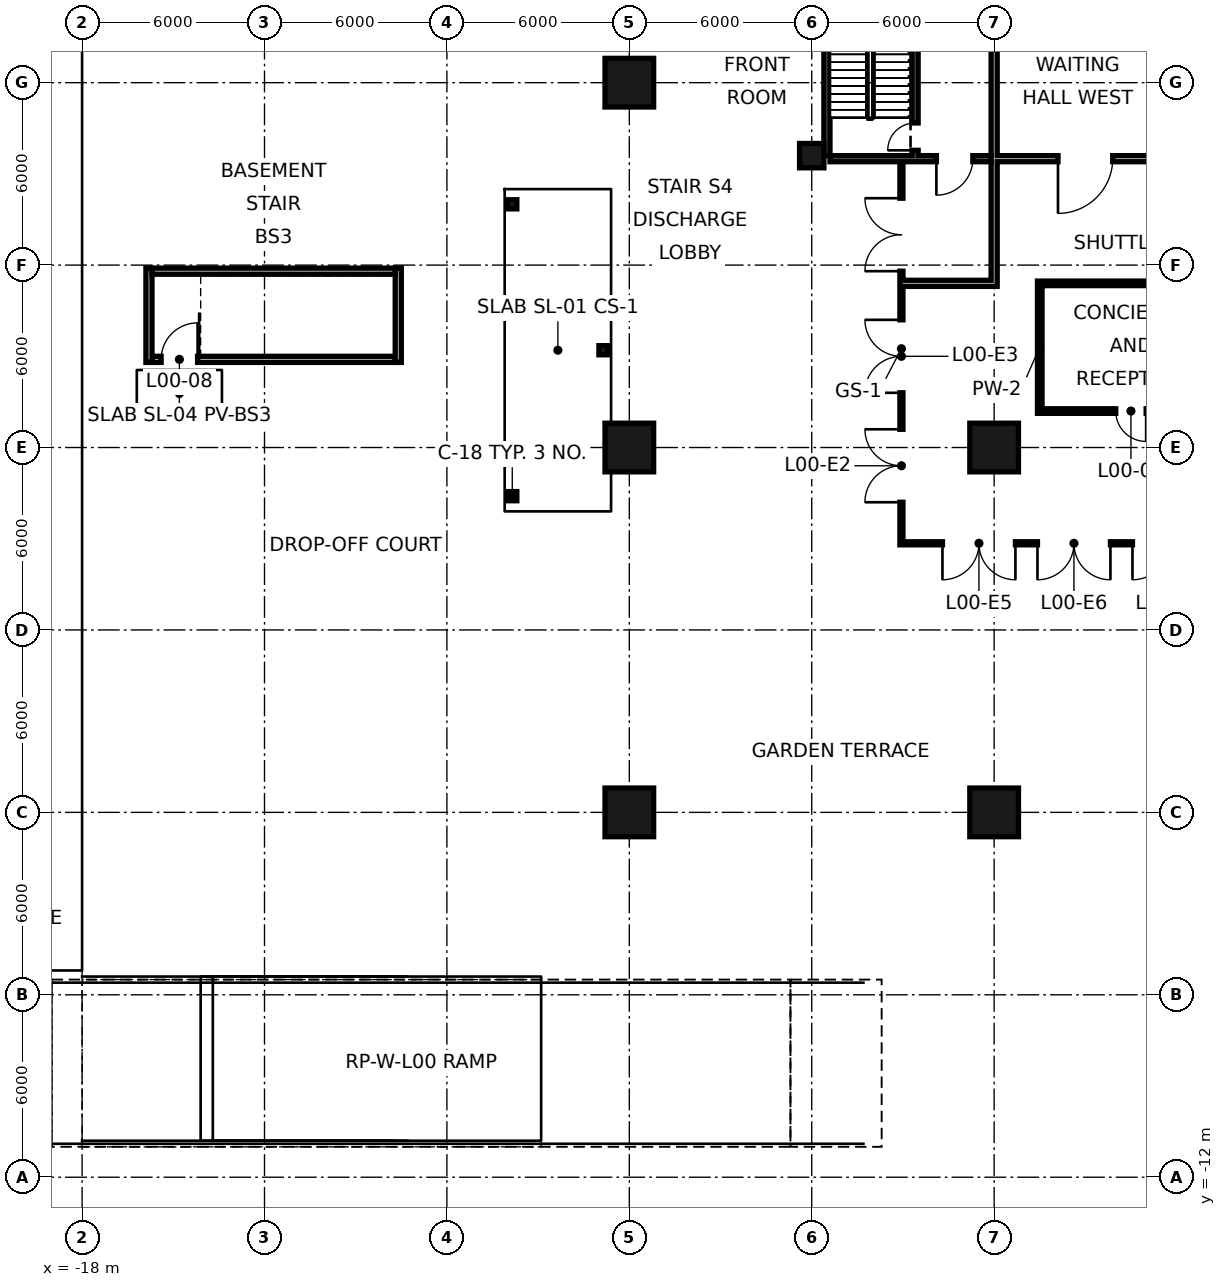
"""IFC4 building model, lengths in metres.
Left out: names, types, materials, properties, quantities, classifications, styles, units other than length and angle.
Written with IfcOpenShell. Run it as: python <this file> out.ifc"""

import sys

from ifc_helpers import new_model, si_unit, direction, frame, frame_2d, origin, origin_2d, place, context, subcontext, project, spatial, rectangle, hollow_rectangle, extrude, element, fill, save


model = new_model("IFC4")
c1 = context("Model", 3, precision=1e-05, world=origin(), true_north=direction((0.0, 1.0)))
c2 = subcontext(c1, "Body", "Model", "MODEL_VIEW")
j1 = project(units=[si_unit("LENGTHUNIT", "METRE"), si_unit("PLANEANGLEUNIT", "RADIAN")], contexts=[c1])
p1 = place(None, origin())
s1 = spatial("IfcSite", under=j1, at=p1, CompositionType="ELEMENT")
p2 = place(p1, origin())
s2 = spatial("IfcBuilding", under=s1, at=p2, CompositionType="ELEMENT")
p3 = place(p2, origin())
s3 = spatial("IfcBuildingStorey", under=s2, at=p3, CompositionType="ELEMENT", Elevation=0.0)
for number, where, z_axis, x_axis in (
    (1, (0.0, 0.0, 0.0), (0.0, 0.0, 1.0), (1.0, 0.0, 0.0)),
    (2, (0.0, 12.0, 0.0), (0.0, 0.0, 1.0), (1.0, 0.0, 0.0)),
    (3, (0.0, 24.0, 0.0), (0.0, 0.0, 1.0), (1.0, 0.0, 0.0)),
):
    element("IfcColumn", number, at=place(p3, frame(where, z_axis=z_axis, x_axis=x_axis)), inside=s3, PredefinedType="COLUMN", context=c2, shape_type="SweptSolid", body=[
        extrude(hollow_rectangle(XDim=1.6, YDim=1.6, WallThickness=0.07, at=origin_2d()), origin(), (0.0, 0.0, 1.0), 15.0),
    ])
p4 = place(p3, frame((6.0, 21.6, 0.0), z_axis=(0.0, 0.0, 1.0), x_axis=(1.0, 0.0, 0.0)))
e4 = element("IfcColumn", 4, at=p4, inside=s3, PredefinedType="COLUMN", context=c2, shape_type="SweptSolid", body=[
    extrude(hollow_rectangle(XDim=0.8, YDim=0.8, WallThickness=0.07, at=origin_2d()), origin(), (0.0, 0.0, 1.0), 15.0),
])
for number, where, z_axis, x_axis in (
    (5, (12.0, 0.0, 0.0), (0.0, 0.0, 1.0), (1.0, 0.0, 0.0)),
    (6, (12.0, 12.0, 0.0), (0.0, 0.0, 1.0), (1.0, 0.0, 0.0)),
):
    element("IfcColumn", number, at=place(p3, frame(where, z_axis=z_axis, x_axis=x_axis)), inside=s3, PredefinedType="COLUMN", context=c2, shape_type="SweptSolid", body=[
        extrude(hollow_rectangle(XDim=1.6, YDim=1.6, WallThickness=0.07, at=origin_2d()), origin(), (0.0, 0.0, 1.0), 15.0),
    ])
p5 = place(p3, frame((8.95, 21.6, 0.0), z_axis=(0.0, 0.0, 1.0), x_axis=(0.0, -1.0, 0.0)))
e7 = element("IfcWall", 7, at=p5, inside=s3, PredefinedType="SOLIDWALL", context=c2, shape_type="SweptSolid", body=[
    extrude(rectangle(XDim=12.7, YDim=0.1, at=frame_2d((6.35, 0.0))), origin(), (0.0, 0.0, 1.0), 13.83),
])
p6 = place(p5, frame((9.0, 0.0, 0.0)))
e8 = element("IfcOpeningElement", 8, at=p6, cuts=e7, PredefinedType="OPENING", context=c2, shape_type="SweptSolid", body=[
    extrude(rectangle(XDim=2.4, YDim=2.6, at=frame_2d((1.2, 1.3))), frame((0.0, 0.06, 0.0), z_axis=(0.0, -1.0, 0.0), x_axis=(1.0, 0.0, 0.0)), (0.0, 0.0, 1.0), 0.12),
])
p7 = place(p5, frame((5.4, 0.0, 0.0)))
e9 = element("IfcOpeningElement", 9, at=p7, cuts=e7, PredefinedType="OPENING", context=c2, shape_type="SweptSolid", body=[
    extrude(rectangle(XDim=2.4, YDim=2.6, at=frame_2d((1.2, 1.3))), frame((0.0, 0.06, 0.0), z_axis=(0.0, -1.0, 0.0), x_axis=(1.0, 0.0, 0.0)), (0.0, 0.0, 1.0), 0.12),
])
p8 = place(p5, frame((1.4, 0.0, 0.0)))
e10 = element("IfcOpeningElement", 10, at=p8, cuts=e7, PredefinedType="OPENING", context=c2, shape_type="SweptSolid", body=[
    extrude(rectangle(XDim=2.4, YDim=2.6, at=frame_2d((1.2, 1.3))), frame((0.0, 0.06, 0.0), z_axis=(0.0, -1.0, 0.0), x_axis=(1.0, 0.0, 0.0)), (0.0, 0.0, 1.0), 0.12),
])
p9 = place(p3, frame((8.9, 8.85, 0.0), z_axis=(0.0, 0.0, 1.0), x_axis=(1.0, 0.0, 0.0)))
e11 = element("IfcWall", 11, at=p9, inside=s3, PredefinedType="SOLIDWALL", context=c2, shape_type="SweptSolid", body=[
    extrude(rectangle(XDim=33.3, YDim=0.1, at=frame_2d((16.65, 0.0))), origin(), (0.0, 0.0, 1.0), 13.83),
])
p10 = place(p9, frame((1.4, 0.0, 0.0)))
e12 = element("IfcOpeningElement", 12, at=p10, cuts=e11, PredefinedType="OPENING", context=c2, shape_type="SweptSolid", body=[
    extrude(rectangle(XDim=2.4, YDim=2.6, at=frame_2d((1.2, 1.3))), frame((0.0, 0.06, 0.0), z_axis=(0.0, -1.0, 0.0), x_axis=(1.0, 0.0, 0.0)), (0.0, 0.0, 1.0), 0.12),
])
p11 = place(p9, frame((4.525, 0.0, 0.0)))
e13 = element("IfcOpeningElement", 13, at=p11, cuts=e11, PredefinedType="OPENING", context=c2, shape_type="SweptSolid", body=[
    extrude(rectangle(XDim=2.4, YDim=2.6, at=frame_2d((1.2, 1.3))), frame((0.0, 0.06, 0.0), z_axis=(0.0, -1.0, 0.0), x_axis=(1.0, 0.0, 0.0)), (0.0, 0.0, 1.0), 0.12),
])
p12 = place(p9, frame((7.65, 0.0, 0.0)))
e14 = element("IfcOpeningElement", 14, at=p12, cuts=e11, PredefinedType="OPENING", context=c2, shape_type="SweptSolid", body=[
    extrude(rectangle(XDim=2.4, YDim=2.6, at=frame_2d((1.2, 1.3))), frame((0.0, 0.06, 0.0), z_axis=(0.0, -1.0, 0.0), x_axis=(1.0, 0.0, 0.0)), (0.0, 0.0, 1.0), 0.12),
])
p13 = place(p9, frame((10.775, 0.0, 0.0)))
e15 = element("IfcOpeningElement", 15, at=p13, cuts=e11, PredefinedType="OPENING", context=c2, shape_type="SweptSolid", body=[
    extrude(rectangle(XDim=2.4, YDim=2.6, at=frame_2d((1.2, 1.3))), frame((0.0, 0.06, 0.0), z_axis=(0.0, -1.0, 0.0), x_axis=(1.0, 0.0, 0.0)), (0.0, 0.0, 1.0), 0.12),
])
p14 = place(p9, frame((13.9, 0.0, 0.0)))
e16 = element("IfcOpeningElement", 16, at=p14, cuts=e11, PredefinedType="OPENING", context=c2, shape_type="SweptSolid", body=[
    extrude(rectangle(XDim=2.4, YDim=2.6, at=frame_2d((1.2, 1.3))), frame((0.0, 0.06, 0.0), z_axis=(0.0, -1.0, 0.0), x_axis=(1.0, 0.0, 0.0)), (0.0, 0.0, 1.0), 0.12),
])
p15 = place(p9, frame((17.025, 0.0, 0.0)))
e17 = element("IfcOpeningElement", 17, at=p15, cuts=e11, PredefinedType="OPENING", context=c2, shape_type="SweptSolid", body=[
    extrude(rectangle(XDim=2.4, YDim=2.6, at=frame_2d((1.2, 1.3))), frame((0.0, 0.06, 0.0), z_axis=(0.0, -1.0, 0.0), x_axis=(1.0, 0.0, 0.0)), (0.0, 0.0, 1.0), 0.12),
])
p16 = place(p9, frame((20.15, 0.0, 0.0)))
e18 = element("IfcOpeningElement", 18, at=p16, cuts=e11, PredefinedType="OPENING", context=c2, shape_type="SweptSolid", body=[
    extrude(rectangle(XDim=2.4, YDim=2.6, at=frame_2d((1.2, 1.3))), frame((0.0, 0.06, 0.0), z_axis=(0.0, -1.0, 0.0), x_axis=(1.0, 0.0, 0.0)), (0.0, 0.0, 1.0), 0.12),
])
p17 = place(p9, frame((23.275, 0.0, 0.0)))
e19 = element("IfcOpeningElement", 19, at=p17, cuts=e11, PredefinedType="OPENING", context=c2, shape_type="SweptSolid", body=[
    extrude(rectangle(XDim=2.4, YDim=2.6, at=frame_2d((1.2, 1.3))), frame((0.0, 0.06, 0.0), z_axis=(0.0, -1.0, 0.0), x_axis=(1.0, 0.0, 0.0)), (0.0, 0.0, 1.0), 0.12),
])
p18 = place(p9, frame((26.4, 0.0, 0.0)))
e20 = element("IfcOpeningElement", 20, at=p18, cuts=e11, PredefinedType="OPENING", context=c2, shape_type="SweptSolid", body=[
    extrude(rectangle(XDim=2.4, YDim=2.6, at=frame_2d((1.2, 1.3))), frame((0.0, 0.06, 0.0), z_axis=(0.0, -1.0, 0.0), x_axis=(1.0, 0.0, 0.0)), (0.0, 0.0, 1.0), 0.12),
])
for number, where, z_axis, x_axis in (
    (21, (-15.8, 14.8, 0.0), (0.0, 0.0, 1.0), (0.0, 1.0, 0.0)),
    (22, (-7.6, 14.8, 0.0), (0.0, 0.0, 1.0), (0.0, 1.0, 0.0)),
):
    element("IfcWall", number, at=place(p3, frame(where, z_axis=z_axis, x_axis=x_axis)), inside=s3, PredefinedType="SOLIDWALL", context=c2, shape_type="SweptSolid", body=[
        extrude(rectangle(XDim=3.1, YDim=0.2, at=frame_2d((1.55, 0.0))), origin(), (0.0, 0.0, 1.0), 14.55),
    ])
p19 = place(p3, frame((12.0, 17.3, 0.0), z_axis=(0.0, 0.0, 1.0), x_axis=(0.0, 1.0, 0.0)))
e23 = element("IfcWall", 23, at=p19, inside=s3, PredefinedType="SOLIDWALL", context=c2, shape_type="SweptSolid", body=[
    extrude(rectangle(XDim=4.2, YDim=0.2, at=frame_2d((2.1, 0.0))), origin(), (0.0, 0.0, 1.0), 13.85),
])
p20 = place(p3, frame((13.5, 13.125, 0.0), z_axis=(0.0, 0.0, 1.0), x_axis=(0.0, 1.0, 0.0)))
e24 = element("IfcWall", 24, at=p20, inside=s3, PredefinedType="PARTITIONING", context=c2, shape_type="SweptSolid", body=[
    extrude(rectangle(XDim=4.35, YDim=0.15, at=frame_2d((2.175, 0.0))), origin(), (0.0, 0.0, 1.0), 14.55),
])
p21 = place(p3, frame((13.575, 13.2, 0.0), z_axis=(0.0, 0.0, 1.0), x_axis=(1.0, 0.0, 0.0)))
e25 = element("IfcWall", 25, at=p21, inside=s3, PredefinedType="PARTITIONING", context=c2, shape_type="SweptSolid", body=[
    extrude(rectangle(XDim=5.85, YDim=0.15, at=frame_2d((2.925, 0.0))), origin(), (0.0, 0.0, 1.0), 14.55),
])
p22 = place(p21, frame((2.425, 0.0, 0.0)))
e26 = element("IfcOpeningElement", 26, at=p22, cuts=e25, PredefinedType="OPENING", context=c2, shape_type="SweptSolid", body=[
    extrude(rectangle(XDim=1.0, YDim=2.4, at=frame_2d((0.5, 1.2))), frame((0.0, 0.085, 0.0), z_axis=(0.0, -1.0, 0.0), x_axis=(1.0, 0.0, 0.0)), (0.0, 0.0, 1.0), 0.17),
])
p23 = place(p3, frame((-15.7, 14.9, 0.0), z_axis=(0.0, 0.0, 1.0), x_axis=(1.0, 0.0, 0.0)))
e27 = element("IfcWall", 27, at=p23, inside=s3, PredefinedType="SOLIDWALL", context=c2, shape_type="SweptSolid", body=[
    extrude(rectangle(XDim=8.0, YDim=0.2, at=frame_2d((4.0, 0.0))), origin(), (0.0, 0.0, 1.0), 14.55),
])
p24 = place(p23, frame((0.3, 0.0, 0.0)))
e28 = element("IfcOpeningElement", 28, at=p24, cuts=e27, PredefinedType="OPENING", context=c2, shape_type="SweptSolid", body=[
    extrude(rectangle(XDim=1.2, YDim=2.4, at=frame_2d((0.6, 1.2))), frame((0.0, 0.11, 0.0), z_axis=(0.0, -1.0, 0.0), x_axis=(1.0, 0.0, 0.0)), (0.0, 0.0, 1.0), 0.22),
])
p25 = place(p3, frame((9.0, 17.4, 0.0), z_axis=(0.0, 0.0, 1.0), x_axis=(1.0, 0.0, 0.0)))
e29 = element("IfcWall", 29, at=p25, inside=s3, PredefinedType="SOLIDWALL", context=c2, shape_type="SweptSolid", body=[
    extrude(rectangle(XDim=2.9, YDim=0.2, at=frame_2d((1.45, 0.0))), origin(), (0.0, 0.0, 1.0), 14.55),
])
p26 = place(p3, frame((13.575, 17.4, 0.0), z_axis=(0.0, 0.0, 1.0), x_axis=(1.0, 0.0, 0.0)))
e30 = element("IfcWall", 30, at=p26, inside=s3, PredefinedType="PARTITIONING", context=c2, shape_type="SweptSolid", body=[
    extrude(rectangle(XDim=5.85, YDim=0.15, at=frame_2d((2.925, 0.0))), origin(), (0.0, 0.0, 1.0), 14.55),
])
p27 = place(p3, frame((-15.7, 17.8, 0.0), z_axis=(0.0, 0.0, 1.0), x_axis=(1.0, 0.0, 0.0)))
e31 = element("IfcWall", 31, at=p27, inside=s3, PredefinedType="SOLIDWALL", context=c2, shape_type="SweptSolid", body=[
    extrude(rectangle(XDim=8.0, YDim=0.2, at=frame_2d((4.0, 0.0))), origin(), (0.0, 0.0, 1.0), 14.55),
])
p28 = place(p3, frame((6.5, 21.6, 0.0), z_axis=(0.0, 0.0, 1.0), x_axis=(0.0, 1.0, 0.0)))
e32 = element("IfcWall", 32, at=p28, inside=s3, PredefinedType="SOLIDWALL", context=c2, shape_type="SweptSolid", body=[
    extrude(rectangle(XDim=23.5, YDim=0.2, at=frame_2d((11.75, 0.0))), origin(), (0.0, 0.0, 1.0), 14.55),
])
p29 = place(p3, frame((12.1, 21.5, 0.0), z_axis=(0.0, 0.0, 1.0), x_axis=(1.0, 0.0, 0.0)))
e33 = element("IfcWall", 33, at=p29, inside=s3, PredefinedType="SOLIDWALL", context=c2, shape_type="SweptSolid", body=[
    extrude(rectangle(XDim=23.8, YDim=0.2, at=frame_2d((11.9, 0.0))), origin(), (0.0, 0.0, 1.0), 13.85),
])
p30 = place(p29, frame((2.0, 0.0, 0.0)))
e34 = element("IfcOpeningElement", 34, at=p30, cuts=e33, PredefinedType="OPENING", context=c2, shape_type="SweptSolid", body=[
    extrude(rectangle(XDim=1.8, YDim=2.1, at=frame_2d((0.9, 1.05))), frame((0.0, 0.11, 0.0), z_axis=(0.0, -1.0, 0.0), x_axis=(1.0, 0.0, 0.0)), (0.0, 0.0, 1.0), 0.22),
])
p31 = place(p29, frame((11.0, 0.0, 0.0)))
e35 = element("IfcOpeningElement", 35, at=p31, cuts=e33, PredefinedType="OPENING", context=c2, shape_type="SweptSolid", body=[
    extrude(rectangle(XDim=1.8, YDim=2.1, at=frame_2d((0.9, 1.05))), frame((0.0, 0.11, 0.0), z_axis=(0.0, -1.0, 0.0), x_axis=(1.0, 0.0, 0.0)), (0.0, 0.0, 1.0), 0.22),
])
p32 = place(p29, frame((20.0, 0.0, 0.0)))
e36 = element("IfcOpeningElement", 36, at=p32, cuts=e33, PredefinedType="OPENING", context=c2, shape_type="SweptSolid", body=[
    extrude(rectangle(XDim=1.8, YDim=2.1, at=frame_2d((0.9, 1.05))), frame((0.0, 0.11, 0.0), z_axis=(0.0, -1.0, 0.0), x_axis=(1.0, 0.0, 0.0)), (0.0, 0.0, 1.0), 0.22),
])
p33 = place(p3, frame((12.0, 21.5, 0.0), z_axis=(0.0, 0.0, 1.0), x_axis=(0.0, 1.0, 0.0)))
e37 = element("IfcWall", 37, at=p33, inside=s3, PredefinedType="PARTITIONING", context=c2, shape_type="SweptSolid", body=[
    extrude(rectangle(XDim=6.0, YDim=0.2, at=frame_2d((3.0, 0.0))), origin(), (0.0, 0.0, 1.0), 13.85),
])
p34 = place(p3, frame((9.4, 21.5, 0.0), z_axis=(0.0, 0.0, 1.0), x_axis=(0.0, 1.0, 0.0)))
e38 = element("IfcWall", 38, at=p34, inside=s3, PredefinedType="SOLIDWALL", context=c2, shape_type="SweptSolid", body=[
    extrude(rectangle(XDim=23.5, YDim=0.2, at=frame_2d((11.75, 0.0))), origin(), (0.0, 0.0, 1.0), 13.85),
])
p35 = place(p34, frame((7.1, 0.0, 0.0)))
e39 = element("IfcOpeningElement", 39, at=p35, cuts=e38, PredefinedType="OPENING", context=c2, shape_type="SweptSolid", body=[
    extrude(rectangle(XDim=1.1, YDim=2.1, at=frame_2d((0.55, 1.05))), frame((0.0, 0.11, 0.0), z_axis=(0.0, -1.0, 0.0), x_axis=(1.0, 0.0, 0.0)), (0.0, 0.0, 1.0), 0.22),
])
p36 = place(p34, frame((10.2, 0.0, 0.0)))
e40 = element("IfcOpeningElement", 40, at=p36, cuts=e38, PredefinedType="OPENING", context=c2, shape_type="SweptSolid", body=[
    extrude(rectangle(XDim=1.1, YDim=2.1, at=frame_2d((0.55, 1.05))), frame((0.0, 0.11, 0.0), z_axis=(0.0, -1.0, 0.0), x_axis=(1.0, 0.0, 0.0)), (0.0, 0.0, 1.0), 0.22),
])
p37 = place(p34, frame((13.3, 0.0, 0.0)))
e41 = element("IfcOpeningElement", 41, at=p37, cuts=e38, PredefinedType="OPENING", context=c2, shape_type="SweptSolid", body=[
    extrude(rectangle(XDim=1.1, YDim=2.1, at=frame_2d((0.55, 1.05))), frame((0.0, 0.11, 0.0), z_axis=(0.0, -1.0, 0.0), x_axis=(1.0, 0.0, 0.0)), (0.0, 0.0, 1.0), 0.22),
])
p38 = place(p34, frame((22.2, 0.0, 0.0)))
e42 = element("IfcOpeningElement", 42, at=p38, cuts=e38, PredefinedType="OPENING", context=c2, shape_type="SweptSolid", body=[
    extrude(rectangle(XDim=1.0, YDim=2.1, at=frame_2d((0.5, 1.05))), frame((0.0, 0.11, 0.0), z_axis=(0.0, -1.0, 0.0), x_axis=(1.0, 0.0, 0.0)), (0.0, 0.0, 1.0), 0.22),
])
p39 = place(p34, frame((0.275, 0.0, 0.0)))
e43 = element("IfcOpeningElement", 43, at=p39, cuts=e38, PredefinedType="OPENING", context=c2, shape_type="SweptSolid", body=[
    extrude(rectangle(XDim=0.9, YDim=2.1, at=frame_2d((0.45, 1.05))), frame((0.0, 0.11, 0.0), z_axis=(0.0, -1.0, 0.0), x_axis=(1.0, 0.0, 0.0)), (0.0, 0.0, 1.0), 0.22),
])
p40 = place(p3, frame((6.6, 21.5, 0.0), z_axis=(0.0, 0.0, 1.0), x_axis=(1.0, 0.0, 0.0)))
e44 = element("IfcWall", 44, at=p40, inside=s3, PredefinedType="SOLIDWALL", context=c2, shape_type="SweptSolid", body=[
    extrude(rectangle(XDim=5.3, YDim=0.2, at=frame_2d((2.65, 0.0))), origin(), (0.0, 0.0, 1.0), 13.85),
])
p41 = place(p40, frame((3.5, 0.0, 0.0)))
e45 = element("IfcOpeningElement", 45, at=p41, cuts=e44, PredefinedType="OPENING", context=c2, shape_type="SweptSolid", body=[
    extrude(rectangle(XDim=1.2, YDim=2.1, at=frame_2d((0.6, 1.05))), frame((0.0, 0.11, 0.0), z_axis=(0.0, -1.0, 0.0), x_axis=(1.0, 0.0, 0.0)), (0.0, 0.0, 1.0), 0.22),
])
for number, where, z_axis, x_axis in (
    (46, (-3.85, 10.4, 0.0), (0.0, 0.0, 1.0), (1.0, 0.0, 0.0)),
    (47, (-3.85, 20.0, 0.0), (0.0, 0.0, 1.0), (1.0, 0.0, 0.0)),
    (48, (-0.85, 15.2, 0.0), (0.0, 0.0, 1.0), (1.0, 0.0, 0.0)),
):
    element("IfcColumn", number, at=place(p3, frame(where, z_axis=z_axis, x_axis=x_axis)), inside=s3, PredefinedType="COLUMN", context=c2, shape_type="SweptSolid", body=[
        extrude(hollow_rectangle(XDim=0.3, YDim=0.3, WallThickness=0.016, at=origin_2d()), origin(), (0.0, 0.0, 1.0), 14.7),
    ])
p42 = place(p6, frame((2.4, 0.0, 0.0), z_axis=(0.0, 0.0, 1.0), x_axis=(-1.0, 0.0, 0.0)))
e49 = element("IfcDoor", 49, at=p42, inside=s3, OperationType="DOUBLE_DOOR_SINGLE_SWING", PredefinedType="DOOR", context=c2, shape_type="SweptSolid", body=[
    extrude(rectangle(XDim=2.4, YDim=2.6, at=frame_2d((1.2, 1.3))), frame((0.0, 0.025, 0.0), z_axis=(0.0, -1.0, 0.0), x_axis=(1.0, 0.0, 0.0)), (0.0, 0.0, 1.0), 0.05),
])
fill(e8, e49)
p43 = place(p7, frame((2.4, 0.0, 0.0), z_axis=(0.0, 0.0, 1.0), x_axis=(-1.0, 0.0, 0.0)))
e50 = element("IfcDoor", 50, at=p43, inside=s3, OperationType="DOUBLE_DOOR_SINGLE_SWING", PredefinedType="DOOR", context=c2, shape_type="SweptSolid", body=[
    extrude(rectangle(XDim=2.4, YDim=2.6, at=frame_2d((1.2, 1.3))), frame((0.0, 0.025, 0.0), z_axis=(0.0, -1.0, 0.0), x_axis=(1.0, 0.0, 0.0)), (0.0, 0.0, 1.0), 0.05),
])
fill(e9, e50)
p44 = place(p8, frame((2.4, 0.0, 0.0), z_axis=(0.0, 0.0, 1.0), x_axis=(-1.0, 0.0, 0.0)))
e51 = element("IfcDoor", 51, at=p44, inside=s3, OperationType="DOUBLE_DOOR_SINGLE_SWING", PredefinedType="DOOR", context=c2, shape_type="SweptSolid", body=[
    extrude(rectangle(XDim=2.4, YDim=2.6, at=frame_2d((1.2, 1.3))), frame((0.0, 0.025, 0.0), z_axis=(0.0, -1.0, 0.0), x_axis=(1.0, 0.0, 0.0)), (0.0, 0.0, 1.0), 0.05),
])
fill(e10, e51)
p45 = place(p10, frame((2.4, 0.0, 0.0), z_axis=(0.0, 0.0, 1.0), x_axis=(-1.0, 0.0, 0.0)))
e52 = element("IfcDoor", 52, at=p45, inside=s3, OperationType="DOUBLE_DOOR_SINGLE_SWING", PredefinedType="DOOR", context=c2, shape_type="SweptSolid", body=[
    extrude(rectangle(XDim=2.4, YDim=2.6, at=frame_2d((1.2, 1.3))), frame((0.0, 0.025, 0.0), z_axis=(0.0, -1.0, 0.0), x_axis=(1.0, 0.0, 0.0)), (0.0, 0.0, 1.0), 0.05),
])
fill(e12, e52)
p46 = place(p11, frame((2.4, 0.0, 0.0), z_axis=(0.0, 0.0, 1.0), x_axis=(-1.0, 0.0, 0.0)))
e53 = element("IfcDoor", 53, at=p46, inside=s3, OperationType="DOUBLE_DOOR_SINGLE_SWING", PredefinedType="DOOR", context=c2, shape_type="SweptSolid", body=[
    extrude(rectangle(XDim=2.4, YDim=2.6, at=frame_2d((1.2, 1.3))), frame((0.0, 0.025, 0.0), z_axis=(0.0, -1.0, 0.0), x_axis=(1.0, 0.0, 0.0)), (0.0, 0.0, 1.0), 0.05),
])
fill(e13, e53)
p47 = place(p12, frame((2.4, 0.0, 0.0), z_axis=(0.0, 0.0, 1.0), x_axis=(-1.0, 0.0, 0.0)))
e54 = element("IfcDoor", 54, at=p47, inside=s3, OperationType="DOUBLE_DOOR_SINGLE_SWING", PredefinedType="DOOR", context=c2, shape_type="SweptSolid", body=[
    extrude(rectangle(XDim=2.4, YDim=2.6, at=frame_2d((1.2, 1.3))), frame((0.0, 0.025, 0.0), z_axis=(0.0, -1.0, 0.0), x_axis=(1.0, 0.0, 0.0)), (0.0, 0.0, 1.0), 0.05),
])
fill(e14, e54)
p48 = place(p22, origin())
e55 = element("IfcDoor", 55, at=p48, inside=s3, OperationType="SINGLE_SWING_RIGHT", PredefinedType="DOOR", context=c2, shape_type="SweptSolid", body=[
    extrude(rectangle(XDim=1.0, YDim=2.4, at=frame_2d((0.5, 1.2))), frame((0.0, 0.025, 0.0), z_axis=(0.0, -1.0, 0.0), x_axis=(1.0, 0.0, 0.0)), (0.0, 0.0, 1.0), 0.05),
])
fill(e26, e55)
p49 = place(p24, frame((1.2, 0.0, 0.0), z_axis=(0.0, 0.0, 1.0), x_axis=(-1.0, 0.0, 0.0)))
e56 = element("IfcDoor", 56, at=p49, inside=s3, OperationType="SINGLE_SWING_LEFT", PredefinedType="DOOR", context=c2, shape_type="SweptSolid", body=[
    extrude(rectangle(XDim=1.2, YDim=2.4, at=frame_2d((0.6, 1.2))), frame((0.0, 0.025, 0.0), z_axis=(0.0, -1.0, 0.0), x_axis=(1.0, 0.0, 0.0)), (0.0, 0.0, 1.0), 0.05),
])
fill(e28, e56)
p50 = place(p30, frame((1.8, 0.0, 0.0), z_axis=(0.0, 0.0, 1.0), x_axis=(-1.0, 0.0, 0.0)))
e57 = element("IfcDoor", 57, at=p50, inside=s3, OperationType="SINGLE_SWING_RIGHT", PredefinedType="DOOR", context=c2, shape_type="SweptSolid", body=[
    extrude(rectangle(XDim=1.8, YDim=2.1, at=frame_2d((0.9, 1.05))), frame((0.0, 0.025, 0.0), z_axis=(0.0, -1.0, 0.0), x_axis=(1.0, 0.0, 0.0)), (0.0, 0.0, 1.0), 0.05),
])
fill(e34, e57)
p51 = place(p41, frame((1.2, 0.0, 0.0), z_axis=(0.0, 0.0, 1.0), x_axis=(-1.0, 0.0, 0.0)))
e58 = element("IfcDoor", 58, at=p51, inside=s3, OperationType="SINGLE_SWING_RIGHT", PredefinedType="DOOR", context=c2, shape_type="SweptSolid", body=[
    extrude(rectangle(XDim=1.2, YDim=2.1, at=frame_2d((0.6, 1.05))), frame((0.0, 0.025, 0.0), z_axis=(0.0, -1.0, 0.0), x_axis=(1.0, 0.0, 0.0)), (0.0, 0.0, 1.0), 0.05),
])
fill(e45, e58)
p52 = place(p39, origin())
e59 = element("IfcDoor", 59, at=p52, inside=s3, OperationType="SINGLE_SWING_LEFT", PredefinedType="DOOR", context=c2, shape_type="SweptSolid", body=[
    extrude(rectangle(XDim=0.9, YDim=2.1, at=frame_2d((0.45, 1.05))), frame((0.0, 0.025, 0.0), z_axis=(0.0, -1.0, 0.0), x_axis=(1.0, 0.0, 0.0)), (0.0, 0.0, 1.0), 0.05),
])
fill(e43, e59)
save(model, sys.argv[1])
